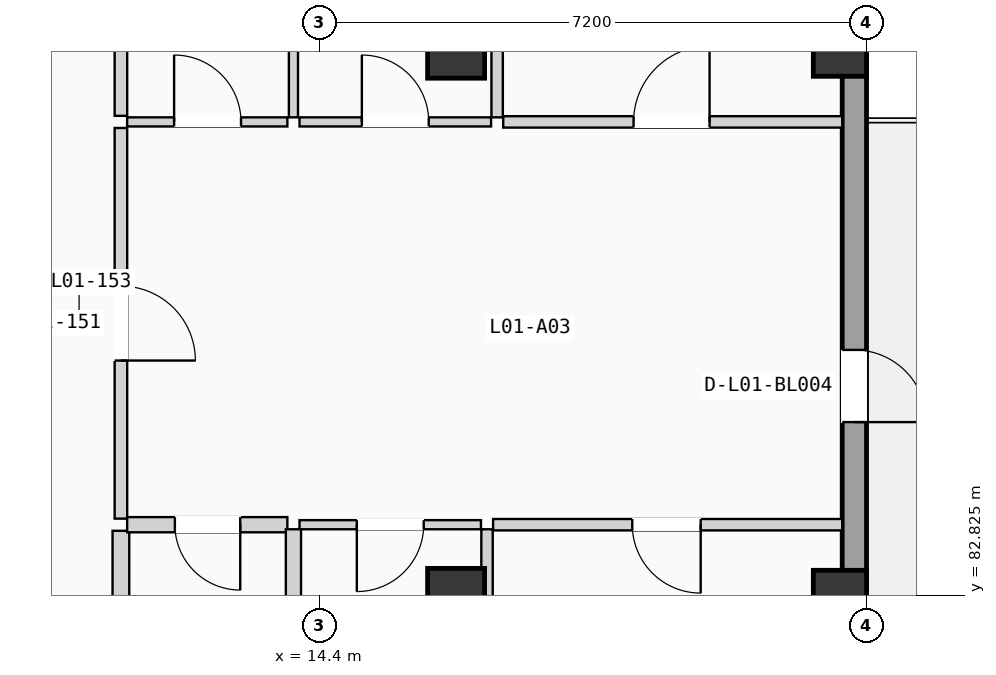
"""IFC4 building model, lengths in metres.
Left out: names, types, materials, properties, quantities, classifications, styles, units other than length and angle.
Written with IfcOpenShell. Run it as: python <this file> out.ifc"""

import sys

from ifc_helpers import new_model, si_unit, direction, frame, frame_2d, origin, origin_2d, place, context, subcontext, project, spatial, rectangle, extrude, element, fill, save


model = new_model("IFC4")
c1 = context("Model", 3, precision=1e-05, world=origin(), true_north=direction((0.0, 1.0)))
c2 = subcontext(c1, "Body", "Model", "MODEL_VIEW")
j1 = project(units=[si_unit("LENGTHUNIT", "METRE"), si_unit("PLANEANGLEUNIT", "RADIAN")], contexts=[c1])
p1 = place(None, origin())
s1 = spatial("IfcSite", under=j1, at=p1, CompositionType="ELEMENT")
p2 = place(p1, origin())
s2 = spatial("IfcBuilding", under=s1, at=p2, CompositionType="ELEMENT")
p3 = place(p2, frame((0.0, 0.0, 4.9)))
s3 = spatial("IfcBuildingStorey", under=s2, at=p3, CompositionType="ELEMENT", Elevation=4.9)
for number, where, z_axis, x_axis in (
    (1, (16.2, 82.8, 0.0), (0.0, 0.0, 1.0), (1.0, 0.0, 0.0)),
    (2, (16.2, 90.0, 0.0), (0.0, 0.0, 1.0), (1.0, 0.0, 0.0)),
):
    element("IfcColumn", number, at=place(p3, frame(where, z_axis=z_axis, x_axis=x_axis)), inside=s3, PredefinedType="COLUMN", context=c2, shape_type="SweptSolid", body=[
        extrude(rectangle(XDim=0.75, YDim=0.75, at=origin_2d()), origin(), (0.0, 0.0, 1.0), 3.675),
    ])
for number, where, z_axis, x_axis in (
    (3, (21.25, 82.8, 0.0), (0.0, 0.0, 1.0), (1.0, 0.0, 0.0)),
    (4, (21.25, 90.0, 0.0), (0.0, 0.0, 1.0), (1.0, 0.0, 0.0)),
):
    element("IfcColumn", number, at=place(p3, frame(where, z_axis=z_axis, x_axis=x_axis)), inside=s3, PredefinedType="COLUMN", context=c2, shape_type="SweptSolid", body=[
        extrude(rectangle(XDim=0.7, YDim=0.7, at=origin_2d()), origin(), (0.0, 0.0, 1.0), 3.675),
    ])
p4 = place(p3, frame((21.44, 68.72, 0.0), z_axis=(0.0, 0.0, 1.0), x_axis=(0.0, 1.0, 0.0)))
e5 = element("IfcWall", 5, at=p4, inside=s3, PredefinedType="SOLIDWALL", context=c2, shape_type="SweptSolid", body=[
    extrude(rectangle(XDim=49.76, YDim=0.32, at=frame_2d((24.88, 0.0))), origin(), (0.0, 0.0, 1.0), 3.415),
])
p5 = place(p4, frame((16.38, 0.0, 0.0)))
e6 = element("IfcOpeningElement", 6, at=p5, cuts=e5, PredefinedType="OPENING", context=c2, shape_type="SweptSolid", body=[
    extrude(rectangle(XDim=0.95, YDim=2.15, at=frame_2d((0.475, 1.075))), frame((0.0, 0.17, 0.0), z_axis=(0.0, -1.0, 0.0), x_axis=(1.0, 0.0, 0.0)), (0.0, 0.0, 1.0), 0.34),
])
p6 = place(p4, frame((9.92, 0.0, 0.9)))
e7 = element("IfcOpeningElement", 7, at=p6, cuts=e5, PredefinedType="OPENING", context=c2, shape_type="SweptSolid", body=[
    extrude(rectangle(XDim=1.25, YDim=1.2, at=frame_2d((0.625, 0.6))), frame((0.0, 0.17, 0.0), z_axis=(0.0, -1.0, 0.0), x_axis=(1.0, 0.0, 0.0)), (0.0, 0.0, 1.0), 0.34),
])
p7 = place(p4, frame((24.255, 0.0, 0.9)))
e8 = element("IfcOpeningElement", 8, at=p7, cuts=e5, PredefinedType="OPENING", context=c2, shape_type="SweptSolid", body=[
    extrude(rectangle(XDim=1.25, YDim=1.35, at=frame_2d((0.625, 0.675))), frame((0.0, 0.17, 0.0), z_axis=(0.0, -1.0, 0.0), x_axis=(1.0, 0.0, 0.0)), (0.0, 0.0, 1.0), 0.34),
])
p8 = place(p4, frame((33.534, 0.0, 0.9)))
e9 = element("IfcOpeningElement", 9, at=p8, cuts=e5, PredefinedType="OPENING", context=c2, shape_type="SweptSolid", body=[
    extrude(rectangle(XDim=1.25, YDim=1.5, at=frame_2d((0.625, 0.75))), frame((0.0, 0.17, 0.0), z_axis=(0.0, -1.0, 0.0), x_axis=(1.0, 0.0, 0.0)), (0.0, 0.0, 1.0), 0.34),
])
p9 = place(p4, frame((30.124, 0.0, 0.9)))
e10 = element("IfcOpeningElement", 10, at=p9, cuts=e5, PredefinedType="OPENING", context=c2, shape_type="SweptSolid", body=[
    extrude(rectangle(XDim=1.25, YDim=1.65, at=frame_2d((0.625, 0.825))), frame((0.0, 0.17, 0.0), z_axis=(0.0, -1.0, 0.0), x_axis=(1.0, 0.0, 0.0)), (0.0, 0.0, 1.0), 0.34),
])
p10 = place(p4, frame((38.636, 0.0, 0.0)))
e11 = element("IfcOpeningElement", 11, at=p10, cuts=e5, PredefinedType="OPENING", context=c2, shape_type="SweptSolid", body=[
    extrude(rectangle(XDim=1.08, YDim=2.18, at=frame_2d((0.54, 1.09))), frame((0.0, 0.17, 0.0), z_axis=(0.0, -1.0, 0.0), x_axis=(1.0, 0.0, 0.0)), (0.0, 0.0, 1.0), 0.34),
])
p11 = place(p3, frame((11.79, 83.83, 0.0), z_axis=(0.0, 0.0, 1.0), x_axis=(0.0, 1.0, 0.0)))
e12 = element("IfcWall", 12, at=p11, inside=s3, PredefinedType="PARTITIONING", context=c2, shape_type="SweptSolid", body=[
    extrude(rectangle(XDim=5.14, YDim=0.165, at=frame_2d((2.57, 0.0))), origin(), (0.0, 0.0, 1.0), 3.395),
])
p12 = place(p11, frame((2.08, 0.0, 0.0)))
e13 = element("IfcOpeningElement", 13, at=p12, cuts=e12, PredefinedType="OPENING", context=c2, shape_type="SweptSolid", body=[
    extrude(rectangle(XDim=0.98, YDim=2.08, at=frame_2d((0.49, 1.04))), frame((0.0, 0.093, 0.0), z_axis=(0.0, -1.0, 0.0), x_axis=(1.0, 0.0, 0.0)), (0.0, 0.0, 1.0), 0.185),
])
p13 = place(p3, frame((11.79, 75.975, 0.0), z_axis=(0.0, 0.0, 1.0), x_axis=(0.0, 1.0, 0.0)))
e14 = element("IfcWall", 14, at=p13, inside=s3, PredefinedType="PLUMBINGWALL", context=c2, shape_type="SweptSolid", body=[
    extrude(rectangle(XDim=7.695, YDim=0.22, at=frame_2d((3.847, 0.0))), origin(), (0.0, 0.0, 1.0), 3.395),
])
p14 = place(p3, frame((11.79, 89.13, 0.0), z_axis=(0.0, 0.0, 1.0), x_axis=(0.0, 1.0, 0.0)))
e15 = element("IfcWall", 15, at=p14, inside=s3, PredefinedType="PARTITIONING", context=c2, shape_type="SweptSolid", body=[
    extrude(rectangle(XDim=7.9, YDim=0.165, at=frame_2d((3.95, 0.0))), origin(), (0.0, 0.0, 1.0), 3.395),
])
p15 = place(p3, frame((11.872, 83.75, 0.0), z_axis=(0.0, 0.0, 1.0), x_axis=(1.0, 0.0, 0.0)))
e16 = element("IfcWall", 16, at=p15, inside=s3, PredefinedType="PLUMBINGWALL", context=c2, shape_type="SweptSolid", body=[
    extrude(rectangle(XDim=2.108, YDim=0.2, at=frame_2d((1.054, 0.0))), origin(), (0.0, 0.0, 1.0), 3.395),
])
p16 = place(p15, frame((0.628, 0.0, 0.0)))
e17 = element("IfcOpeningElement", 17, at=p16, cuts=e16, PredefinedType="OPENING", context=c2, shape_type="SweptSolid", body=[
    extrude(rectangle(XDim=0.86, YDim=2.0, at=frame_2d((0.43, 1.0))), frame((0.0, 0.11, 0.0), z_axis=(0.0, -1.0, 0.0), x_axis=(1.0, 0.0, 0.0)), (0.0, 0.0, 1.0), 0.22),
])
p17 = place(p3, frame((11.872, 89.05, 0.0), z_axis=(0.0, 0.0, 1.0), x_axis=(1.0, 0.0, 0.0)))
e18 = element("IfcWall", 18, at=p17, inside=s3, PredefinedType="PARTITIONING", context=c2, shape_type="SweptSolid", body=[
    extrude(rectangle(XDim=2.108, YDim=0.12, at=frame_2d((1.054, 0.0))), origin(), (0.0, 0.0, 1.0), 3.395),
])
p18 = place(p17, frame((0.618, 0.0, 0.0)))
e19 = element("IfcOpeningElement", 19, at=p18, cuts=e18, PredefinedType="OPENING", context=c2, shape_type="SweptSolid", body=[
    extrude(rectangle(XDim=0.88, YDim=2.02, at=frame_2d((0.44, 1.01))), frame((0.0, 0.07, 0.0), z_axis=(0.0, -1.0, 0.0), x_axis=(1.0, 0.0, 0.0)), (0.0, 0.0, 1.0), 0.14),
])
p19 = place(p3, frame((16.687, 83.75, 0.0), z_axis=(0.0, 0.0, 1.0), x_axis=(1.0, 0.0, 0.0)))
e20 = element("IfcWall", 20, at=p19, inside=s3, PredefinedType="PARTITIONING", context=c2, shape_type="SweptSolid", body=[
    extrude(rectangle(XDim=4.593, YDim=0.15, at=frame_2d((2.296, 0.0))), origin(), (0.0, 0.0, 1.0), 3.395),
])
p20 = place(p19, frame((1.831, 0.0, 0.0)))
e21 = element("IfcOpeningElement", 21, at=p20, cuts=e20, PredefinedType="OPENING", context=c2, shape_type="SweptSolid", body=[
    extrude(rectangle(XDim=0.9, YDim=2.04, at=frame_2d((0.45, 1.02))), frame((0.0, 0.085, 0.0), z_axis=(0.0, -1.0, 0.0), x_axis=(1.0, 0.0, 0.0)), (0.0, 0.0, 1.0), 0.17),
])
p21 = place(p3, frame((14.14, 83.75, 0.0), z_axis=(0.0, 0.0, 1.0), x_axis=(1.0, 0.0, 0.0)))
e22 = element("IfcWall", 22, at=p21, inside=s3, PredefinedType="PARTITIONING", context=c2, shape_type="SweptSolid", body=[
    extrude(rectangle(XDim=2.387, YDim=0.12, at=frame_2d((1.194, 0.0))), origin(), (0.0, 0.0, 1.0), 3.395),
])
p22 = place(p21, frame((0.754, 0.0, 0.0)))
e23 = element("IfcOpeningElement", 23, at=p22, cuts=e22, PredefinedType="OPENING", context=c2, shape_type="SweptSolid", body=[
    extrude(rectangle(XDim=0.88, YDim=2.02, at=frame_2d((0.44, 1.01))), frame((0.0, 0.07, 0.0), z_axis=(0.0, -1.0, 0.0), x_axis=(1.0, 0.0, 0.0)), (0.0, 0.0, 1.0), 0.14),
])
p23 = place(p3, frame((16.82, 89.05, 0.0), z_axis=(0.0, 0.0, 1.0), x_axis=(1.0, 0.0, 0.0)))
e24 = element("IfcWall", 24, at=p23, inside=s3, PredefinedType="PARTITIONING", context=c2, shape_type="SweptSolid", body=[
    extrude(rectangle(XDim=4.46, YDim=0.15, at=frame_2d((2.23, 0.0))), origin(), (0.0, 0.0, 1.0), 3.395),
])
p24 = place(p23, frame((1.715, 0.0, 0.0)))
e25 = element("IfcOpeningElement", 25, at=p24, cuts=e24, PredefinedType="OPENING", context=c2, shape_type="SweptSolid", body=[
    extrude(rectangle(XDim=1.0, YDim=2.06, at=frame_2d((0.5, 1.03))), frame((0.0, 0.085, 0.0), z_axis=(0.0, -1.0, 0.0), x_axis=(1.0, 0.0, 0.0)), (0.0, 0.0, 1.0), 0.17),
])
p25 = place(p3, frame((14.14, 89.05, 0.0), z_axis=(0.0, 0.0, 1.0), x_axis=(1.0, 0.0, 0.0)))
e26 = element("IfcWall", 26, at=p25, inside=s3, PredefinedType="PARTITIONING", context=c2, shape_type="SweptSolid", body=[
    extrude(rectangle(XDim=2.52, YDim=0.12, at=frame_2d((1.26, 0.0))), origin(), (0.0, 0.0, 1.0), 3.395),
])
p26 = place(p25, frame((0.82, 0.0, 0.0)))
e27 = element("IfcOpeningElement", 27, at=p26, cuts=e26, PredefinedType="OPENING", context=c2, shape_type="SweptSolid", body=[
    extrude(rectangle(XDim=0.88, YDim=2.02, at=frame_2d((0.44, 1.01))), frame((0.0, 0.07, 0.0), z_axis=(0.0, -1.0, 0.0), x_axis=(1.0, 0.0, 0.0)), (0.0, 0.0, 1.0), 0.14),
])
p27 = place(p3, frame((14.06, 75.975, 0.0), z_axis=(0.0, 0.0, 1.0), x_axis=(0.0, 1.0, 0.0)))
e28 = element("IfcWall", 28, at=p27, inside=s3, PredefinedType="PLUMBINGWALL", context=c2, shape_type="SweptSolid", body=[
    extrude(rectangle(XDim=7.715, YDim=0.2, at=frame_2d((3.857, 0.0))), origin(), (0.0, 0.0, 1.0), 3.395),
])
p28 = place(p27, frame((3.435, 0.0, 0.0)))
e29 = element("IfcOpeningElement", 29, at=p28, cuts=e28, PredefinedType="OPENING", context=c2, shape_type="SweptSolid", body=[
    extrude(rectangle(XDim=0.85, YDim=2.01, at=frame_2d((0.425, 1.005))), frame((0.0, 0.11, 0.0), z_axis=(0.0, -1.0, 0.0), x_axis=(1.0, 0.0, 0.0)), (0.0, 0.0, 1.0), 0.22),
])
p29 = place(p3, frame((14.06, 89.11, 0.0), z_axis=(0.0, 0.0, 1.0), x_axis=(0.0, 1.0, 0.0)))
e30 = element("IfcWall", 30, at=p29, inside=s3, PredefinedType="PARTITIONING", context=c2, shape_type="SweptSolid", body=[
    extrude(rectangle(XDim=7.92, YDim=0.12, at=frame_2d((3.96, 0.0))), origin(), (0.0, 0.0, 1.0), 3.395),
])
p30 = place(p3, frame((16.607, 76.0, 0.0), z_axis=(0.0, 0.0, 1.0), x_axis=(0.0, 1.0, 0.0)))
e31 = element("IfcWall", 31, at=p30, inside=s3, PredefinedType="PARTITIONING", context=c2, shape_type="SweptSolid", body=[
    extrude(rectangle(XDim=7.69, YDim=0.15, at=frame_2d((3.845, 0.0))), origin(), (0.0, 0.0, 1.0), 3.395),
])
p31 = place(p3, frame((16.74, 89.11, 0.0), z_axis=(0.0, 0.0, 1.0), x_axis=(0.0, 1.0, 0.0)))
e32 = element("IfcWall", 32, at=p31, inside=s3, PredefinedType="PARTITIONING", context=c2, shape_type="SweptSolid", body=[
    extrude(rectangle(XDim=7.92, YDim=0.15, at=frame_2d((3.96, 0.0))), origin(), (0.0, 0.0, 1.0), 3.395),
])
p32 = place(p5, frame((0.95, 0.0, 0.0), z_axis=(0.0, 0.0, 1.0), x_axis=(-1.0, 0.0, 0.0)))
e33 = element("IfcDoor", 33, at=p32, inside=s3, OperationType="SINGLE_SWING_LEFT", PredefinedType="DOOR", context=c2, shape_type="SweptSolid", body=[
    extrude(rectangle(XDim=0.95, YDim=2.15, at=frame_2d((0.475, 1.075))), frame((0.0, 0.025, 0.0), z_axis=(0.0, -1.0, 0.0), x_axis=(1.0, 0.0, 0.0)), (0.0, 0.0, 1.0), 0.05),
])
fill(e6, e33)
p33 = place(p12, frame((0.98, 0.0, 0.0), z_axis=(0.0, 0.0, 1.0), x_axis=(-1.0, 0.0, 0.0)))
e34 = element("IfcDoor", 34, at=p33, inside=s3, OperationType="SINGLE_SWING_LEFT", PredefinedType="DOOR", context=c2, shape_type="SweptSolid", body=[
    extrude(rectangle(XDim=0.98, YDim=2.08, at=frame_2d((0.49, 1.04))), frame((0.0, 0.025, 0.0), z_axis=(0.0, -1.0, 0.0), x_axis=(1.0, 0.0, 0.0)), (0.0, 0.0, 1.0), 0.05),
])
fill(e13, e34)
p34 = place(p16, frame((0.86, 0.0, 0.0), z_axis=(0.0, 0.0, 1.0), x_axis=(-1.0, 0.0, 0.0)))
e35 = element("IfcDoor", 35, at=p34, inside=s3, OperationType="SINGLE_SWING_RIGHT", PredefinedType="DOOR", context=c2, shape_type="SweptSolid", body=[
    extrude(rectangle(XDim=0.86, YDim=2.0, at=frame_2d((0.43, 1.0))), frame((0.0, 0.025, 0.0), z_axis=(0.0, -1.0, 0.0), x_axis=(1.0, 0.0, 0.0)), (0.0, 0.0, 1.0), 0.05),
])
fill(e17, e35)
p35 = place(p18, origin())
e36 = element("IfcDoor", 36, at=p35, inside=s3, OperationType="SINGLE_SWING_LEFT", PredefinedType="DOOR", context=c2, shape_type="SweptSolid", body=[
    extrude(rectangle(XDim=0.88, YDim=2.02, at=frame_2d((0.44, 1.01))), frame((0.0, 0.025, 0.0), z_axis=(0.0, -1.0, 0.0), x_axis=(1.0, 0.0, 0.0)), (0.0, 0.0, 1.0), 0.05),
])
fill(e19, e36)
p36 = place(p20, frame((0.9, 0.0, 0.0), z_axis=(0.0, 0.0, 1.0), x_axis=(-1.0, 0.0, 0.0)))
e37 = element("IfcDoor", 37, at=p36, inside=s3, OperationType="SINGLE_SWING_RIGHT", PredefinedType="DOOR", context=c2, shape_type="SweptSolid", body=[
    extrude(rectangle(XDim=0.9, YDim=2.04, at=frame_2d((0.45, 1.02))), frame((0.0, 0.025, 0.0), z_axis=(0.0, -1.0, 0.0), x_axis=(1.0, 0.0, 0.0)), (0.0, 0.0, 1.0), 0.05),
])
fill(e21, e37)
p37 = place(p22, frame((0.88, 0.0, 0.0), z_axis=(0.0, 0.0, 1.0), x_axis=(-1.0, 0.0, 0.0)))
e38 = element("IfcDoor", 38, at=p37, inside=s3, OperationType="SINGLE_SWING_LEFT", PredefinedType="DOOR", context=c2, shape_type="SweptSolid", body=[
    extrude(rectangle(XDim=0.88, YDim=2.02, at=frame_2d((0.44, 1.01))), frame((0.0, 0.025, 0.0), z_axis=(0.0, -1.0, 0.0), x_axis=(1.0, 0.0, 0.0)), (0.0, 0.0, 1.0), 0.05),
])
fill(e23, e38)
p38 = place(p24, origin())
e39 = element("IfcDoor", 39, at=p38, inside=s3, OperationType="SINGLE_SWING_RIGHT", PredefinedType="DOOR", context=c2, shape_type="SweptSolid", body=[
    extrude(rectangle(XDim=1.0, YDim=2.06, at=frame_2d((0.5, 1.03))), frame((0.0, 0.025, 0.0), z_axis=(0.0, -1.0, 0.0), x_axis=(1.0, 0.0, 0.0)), (0.0, 0.0, 1.0), 0.05),
])
fill(e25, e39)
p39 = place(p26, origin())
e40 = element("IfcDoor", 40, at=p39, inside=s3, OperationType="SINGLE_SWING_LEFT", PredefinedType="DOOR", context=c2, shape_type="SweptSolid", body=[
    extrude(rectangle(XDim=0.88, YDim=2.02, at=frame_2d((0.44, 1.01))), frame((0.0, 0.025, 0.0), z_axis=(0.0, -1.0, 0.0), x_axis=(1.0, 0.0, 0.0)), (0.0, 0.0, 1.0), 0.05),
])
fill(e27, e40)
save(model, sys.argv[1])
